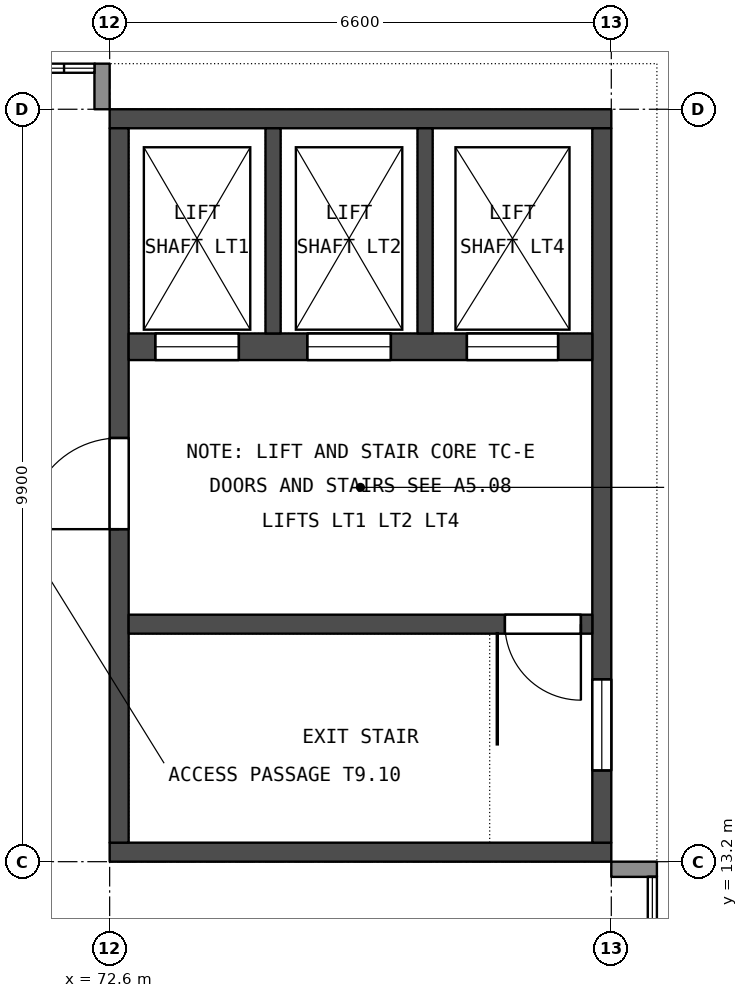
"""IFC4 building model, lengths in metres.
Left out: names, types, materials, properties, quantities, classifications, styles, units other than length and angle.
Written with IfcOpenShell. Run it as: python <this file> out.ifc"""

import sys

from ifc_helpers import new_model, si_unit, direction, frame, frame_2d, origin, place, context, subcontext, project, spatial, rectangle, extrude, element, fill, save


model = new_model("IFC4")
c1 = context("Model", 3, precision=1e-05, world=origin(), true_north=direction((0.0, 1.0)))
c2 = subcontext(c1, "Body", "Model", "MODEL_VIEW")
j1 = project(units=[si_unit("LENGTHUNIT", "METRE"), si_unit("PLANEANGLEUNIT", "RADIAN")], contexts=[c1])
p1 = place(None, origin())
s1 = spatial("IfcSite", under=j1, at=p1, CompositionType="ELEMENT")
p2 = place(p1, origin())
s2 = spatial("IfcBuilding", under=s1, at=p2, CompositionType="ELEMENT")
p3 = place(p2, frame((0.0, 0.0, 41.4)))
s3 = spatial("IfcBuildingStorey", under=s2, at=p3, CompositionType="ELEMENT", Elevation=41.4)
for number, where, z_axis, x_axis in (
    (1, (72.6, 13.325, 0.0), (0.0, 0.0, 1.0), (1.0, 0.0, 0.0)),
    (2, (72.6, 22.975, 0.0), (0.0, 0.0, 1.0), (1.0, 0.0, 0.0)),
):
    element("IfcWall", number, at=place(p3, frame(where, z_axis=z_axis, x_axis=x_axis)), inside=s3, PredefinedType="SHEAR", context=c2, shape_type="SweptSolid", body=[
        extrude(rectangle(XDim=6.6, YDim=0.25, at=frame_2d((3.3, 0.0))), origin(), (0.0, 0.0, 1.0), 4.25),
    ])
p4 = place(p3, frame((72.725, 13.45, 0.0), z_axis=(0.0, 0.0, 1.0), x_axis=(0.0, 1.0, 0.0)))
e3 = element("IfcWall", 3, at=p4, inside=s3, PredefinedType="SHEAR", context=c2, shape_type="SweptSolid", body=[
    extrude(rectangle(XDim=9.4, YDim=0.25, at=frame_2d((4.7, 0.0))), origin(), (0.0, 0.0, 1.0), 4.25),
])
p5 = place(p4, frame((4.125, 0.0, 0.0)))
e4 = element("IfcOpeningElement", 4, at=p5, cuts=e3, PredefinedType="OPENING", context=c2, shape_type="SweptSolid", body=[
    extrude(rectangle(XDim=1.2, YDim=2.1, at=frame_2d((0.6, 1.05))), frame((0.0, 0.135, 0.0), z_axis=(0.0, -1.0, 0.0), x_axis=(1.0, 0.0, 0.0)), (0.0, 0.0, 1.0), 0.27),
])
p6 = place(p3, frame((79.075, 13.45, 0.0), z_axis=(0.0, 0.0, 1.0), x_axis=(0.0, 1.0, 0.0)))
e5 = element("IfcWall", 5, at=p6, inside=s3, PredefinedType="SHEAR", context=c2, shape_type="SweptSolid", body=[
    extrude(rectangle(XDim=9.4, YDim=0.25, at=frame_2d((4.7, 0.0))), origin(), (0.0, 0.0, 1.0), 4.25),
])
p7 = place(p6, frame((0.95, 0.0, 0.7)))
e6 = element("IfcOpeningElement", 6, at=p7, cuts=e5, PredefinedType="OPENING", context=c2, shape_type="SweptSolid", body=[
    extrude(rectangle(XDim=1.2, YDim=1.8, at=frame_2d((0.6, 0.9))), frame((0.0, 0.135, 0.0), z_axis=(0.0, -1.0, 0.0), x_axis=(1.0, 0.0, 0.0)), (0.0, 0.0, 1.0), 0.27),
])
p8 = place(p3, frame((72.85, 16.325, 0.0), z_axis=(0.0, 0.0, 1.0), x_axis=(1.0, 0.0, 0.0)))
e7 = element("IfcWall", 7, at=p8, inside=s3, PredefinedType="SHEAR", context=c2, shape_type="SweptSolid", body=[
    extrude(rectangle(XDim=6.1, YDim=0.25, at=frame_2d((3.05, 0.0))), origin(), (0.0, 0.0, 1.0), 4.25),
])
p9 = place(p8, frame((4.95, 0.0, 0.0)))
e8 = element("IfcOpeningElement", 8, at=p9, cuts=e7, PredefinedType="OPENING", context=c2, shape_type="SweptSolid", body=[
    extrude(rectangle(XDim=1.0, YDim=2.2, at=frame_2d((0.5, 1.1))), frame((0.0, 0.135, 0.0), z_axis=(0.0, -1.0, 0.0), x_axis=(1.0, 0.0, 0.0)), (0.0, 0.0, 1.0), 0.27),
])
p10 = place(p3, frame((72.85, 19.975, 0.0), z_axis=(0.0, 0.0, 1.0), x_axis=(1.0, 0.0, 0.0)))
e9 = element("IfcWall", 9, at=p10, inside=s3, PredefinedType="SHEAR", context=c2, shape_type="SweptSolid", body=[
    extrude(rectangle(XDim=6.1, YDim=0.35, at=frame_2d((3.05, 0.0))), origin(), (0.0, 0.0, 1.0), 4.25),
])
p11 = place(p10, frame((0.35, 0.0, 0.0)))
e10 = element("IfcOpeningElement", 10, at=p11, cuts=e9, PredefinedType="OPENING", context=c2, shape_type="SweptSolid", body=[
    extrude(rectangle(XDim=1.1, YDim=2.2, at=frame_2d((0.55, 1.1))), frame((0.0, 0.185, 0.0), z_axis=(0.0, -1.0, 0.0), x_axis=(1.0, 0.0, 0.0)), (0.0, 0.0, 1.0), 0.37),
])
p12 = place(p10, frame((2.35, 0.0, 0.0)))
e11 = element("IfcOpeningElement", 11, at=p12, cuts=e9, PredefinedType="OPENING", context=c2, shape_type="SweptSolid", body=[
    extrude(rectangle(XDim=1.1, YDim=2.2, at=frame_2d((0.55, 1.1))), frame((0.0, 0.185, 0.0), z_axis=(0.0, -1.0, 0.0), x_axis=(1.0, 0.0, 0.0)), (0.0, 0.0, 1.0), 0.37),
])
p13 = place(p10, frame((4.45, 0.0, 0.0)))
e12 = element("IfcOpeningElement", 12, at=p13, cuts=e9, PredefinedType="OPENING", context=c2, shape_type="SweptSolid", body=[
    extrude(rectangle(XDim=1.2, YDim=2.3, at=frame_2d((0.6, 1.15))), frame((0.0, 0.185, 0.0), z_axis=(0.0, -1.0, 0.0), x_axis=(1.0, 0.0, 0.0)), (0.0, 0.0, 1.0), 0.37),
])
for number, where, z_axis, x_axis in (
    (13, (74.75, 20.15, 0.0), (0.0, 0.0, 1.0), (0.0, 1.0, 0.0)),
    (14, (76.75, 20.15, 0.0), (0.0, 0.0, 1.0), (0.0, 1.0, 0.0)),
):
    element("IfcWall", number, at=place(p3, frame(where, z_axis=z_axis, x_axis=x_axis)), inside=s3, PredefinedType="SHEAR", context=c2, shape_type="SweptSolid", body=[
        extrude(rectangle(XDim=2.7, YDim=0.2, at=frame_2d((1.35, 0.0))), origin(), (0.0, 0.0, 1.0), 4.25),
    ])
p14 = place(p3, frame((79.2, 13.1, 0.0), z_axis=(0.0, 0.0, 1.0), x_axis=(1.0, 0.0, 0.0)))
e15 = element("IfcWall", 15, at=p14, inside=s3, PredefinedType="STANDARD", context=c2, shape_type="SweptSolid", body=[
    extrude(rectangle(XDim=0.6, YDim=0.2, at=frame_2d((0.3, 0.0))), origin(), (0.0, 0.0, 1.0), 3.65),
])
p15 = place(p3, frame((72.5, 23.1, 0.0), z_axis=(0.0, 0.0, 1.0), x_axis=(0.0, 1.0, 0.0)))
e16 = element("IfcWall", 16, at=p15, inside=s3, PredefinedType="STANDARD", context=c2, shape_type="SweptSolid", body=[
    extrude(rectangle(XDim=0.6, YDim=0.2, at=frame_2d((0.3, 0.0))), origin(), (0.0, 0.0, 1.0), 3.65),
])
p16 = place(p5, origin())
e17 = element("IfcDoor", 17, at=p16, inside=s3, OperationType="SINGLE_SWING_LEFT", PredefinedType="DOOR", context=c2, shape_type="SweptSolid", body=[
    extrude(rectangle(XDim=1.2, YDim=2.1, at=frame_2d((0.6, 1.05))), frame((0.0, 0.025, 0.0), z_axis=(0.0, -1.0, 0.0), x_axis=(1.0, 0.0, 0.0)), (0.0, 0.0, 1.0), 0.05),
])
fill(e4, e17)
p17 = place(p9, origin())
e18 = element("IfcDoor", 18, at=p17, inside=s3, OperationType="SINGLE_SWING_RIGHT", PredefinedType="DOOR", context=c2, shape_type="SweptSolid", body=[
    extrude(rectangle(XDim=1.0, YDim=2.2, at=frame_2d((0.5, 1.1))), frame((0.0, 0.025, 0.0), z_axis=(0.0, -1.0, 0.0), x_axis=(1.0, 0.0, 0.0)), (0.0, 0.0, 1.0), 0.05),
])
fill(e8, e18)
p18 = place(p11, origin())
e19 = element("IfcDoor", 19, at=p18, inside=s3, OperationType="DOUBLE_DOOR_SLIDING", PredefinedType="NOTDEFINED", context=c2, shape_type="SweptSolid", body=[
    extrude(rectangle(XDim=1.1, YDim=2.2, at=frame_2d((0.55, 1.1))), frame((0.0, 0.025, 0.0), z_axis=(0.0, -1.0, 0.0), x_axis=(1.0, 0.0, 0.0)), (0.0, 0.0, 1.0), 0.05),
])
fill(e10, e19)
p19 = place(p12, origin())
e20 = element("IfcDoor", 20, at=p19, inside=s3, OperationType="DOUBLE_DOOR_SLIDING", PredefinedType="NOTDEFINED", context=c2, shape_type="SweptSolid", body=[
    extrude(rectangle(XDim=1.1, YDim=2.2, at=frame_2d((0.55, 1.1))), frame((0.0, 0.025, 0.0), z_axis=(0.0, -1.0, 0.0), x_axis=(1.0, 0.0, 0.0)), (0.0, 0.0, 1.0), 0.05),
])
fill(e11, e20)
p20 = place(p13, origin())
e21 = element("IfcDoor", 21, at=p20, inside=s3, OperationType="DOUBLE_DOOR_SLIDING", PredefinedType="NOTDEFINED", context=c2, shape_type="SweptSolid", body=[
    extrude(rectangle(XDim=1.2, YDim=2.3, at=frame_2d((0.6, 1.15))), frame((0.0, 0.025, 0.0), z_axis=(0.0, -1.0, 0.0), x_axis=(1.0, 0.0, 0.0)), (0.0, 0.0, 1.0), 0.05),
])
fill(e12, e21)
p21 = place(p7, origin())
e22 = element("IfcWindow", 22, at=p21, inside=s3, PartitioningType="SINGLE_PANEL", PredefinedType="WINDOW", context=c2, shape_type="SweptSolid", body=[
    extrude(rectangle(XDim=1.2, YDim=1.8, at=frame_2d((0.6, 0.9))), frame((0.0, 0.03, 0.0), z_axis=(0.0, -1.0, 0.0), x_axis=(1.0, 0.0, 0.0)), (0.0, 0.0, 1.0), 0.06),
])
fill(e6, e22)
save(model, sys.argv[1])
